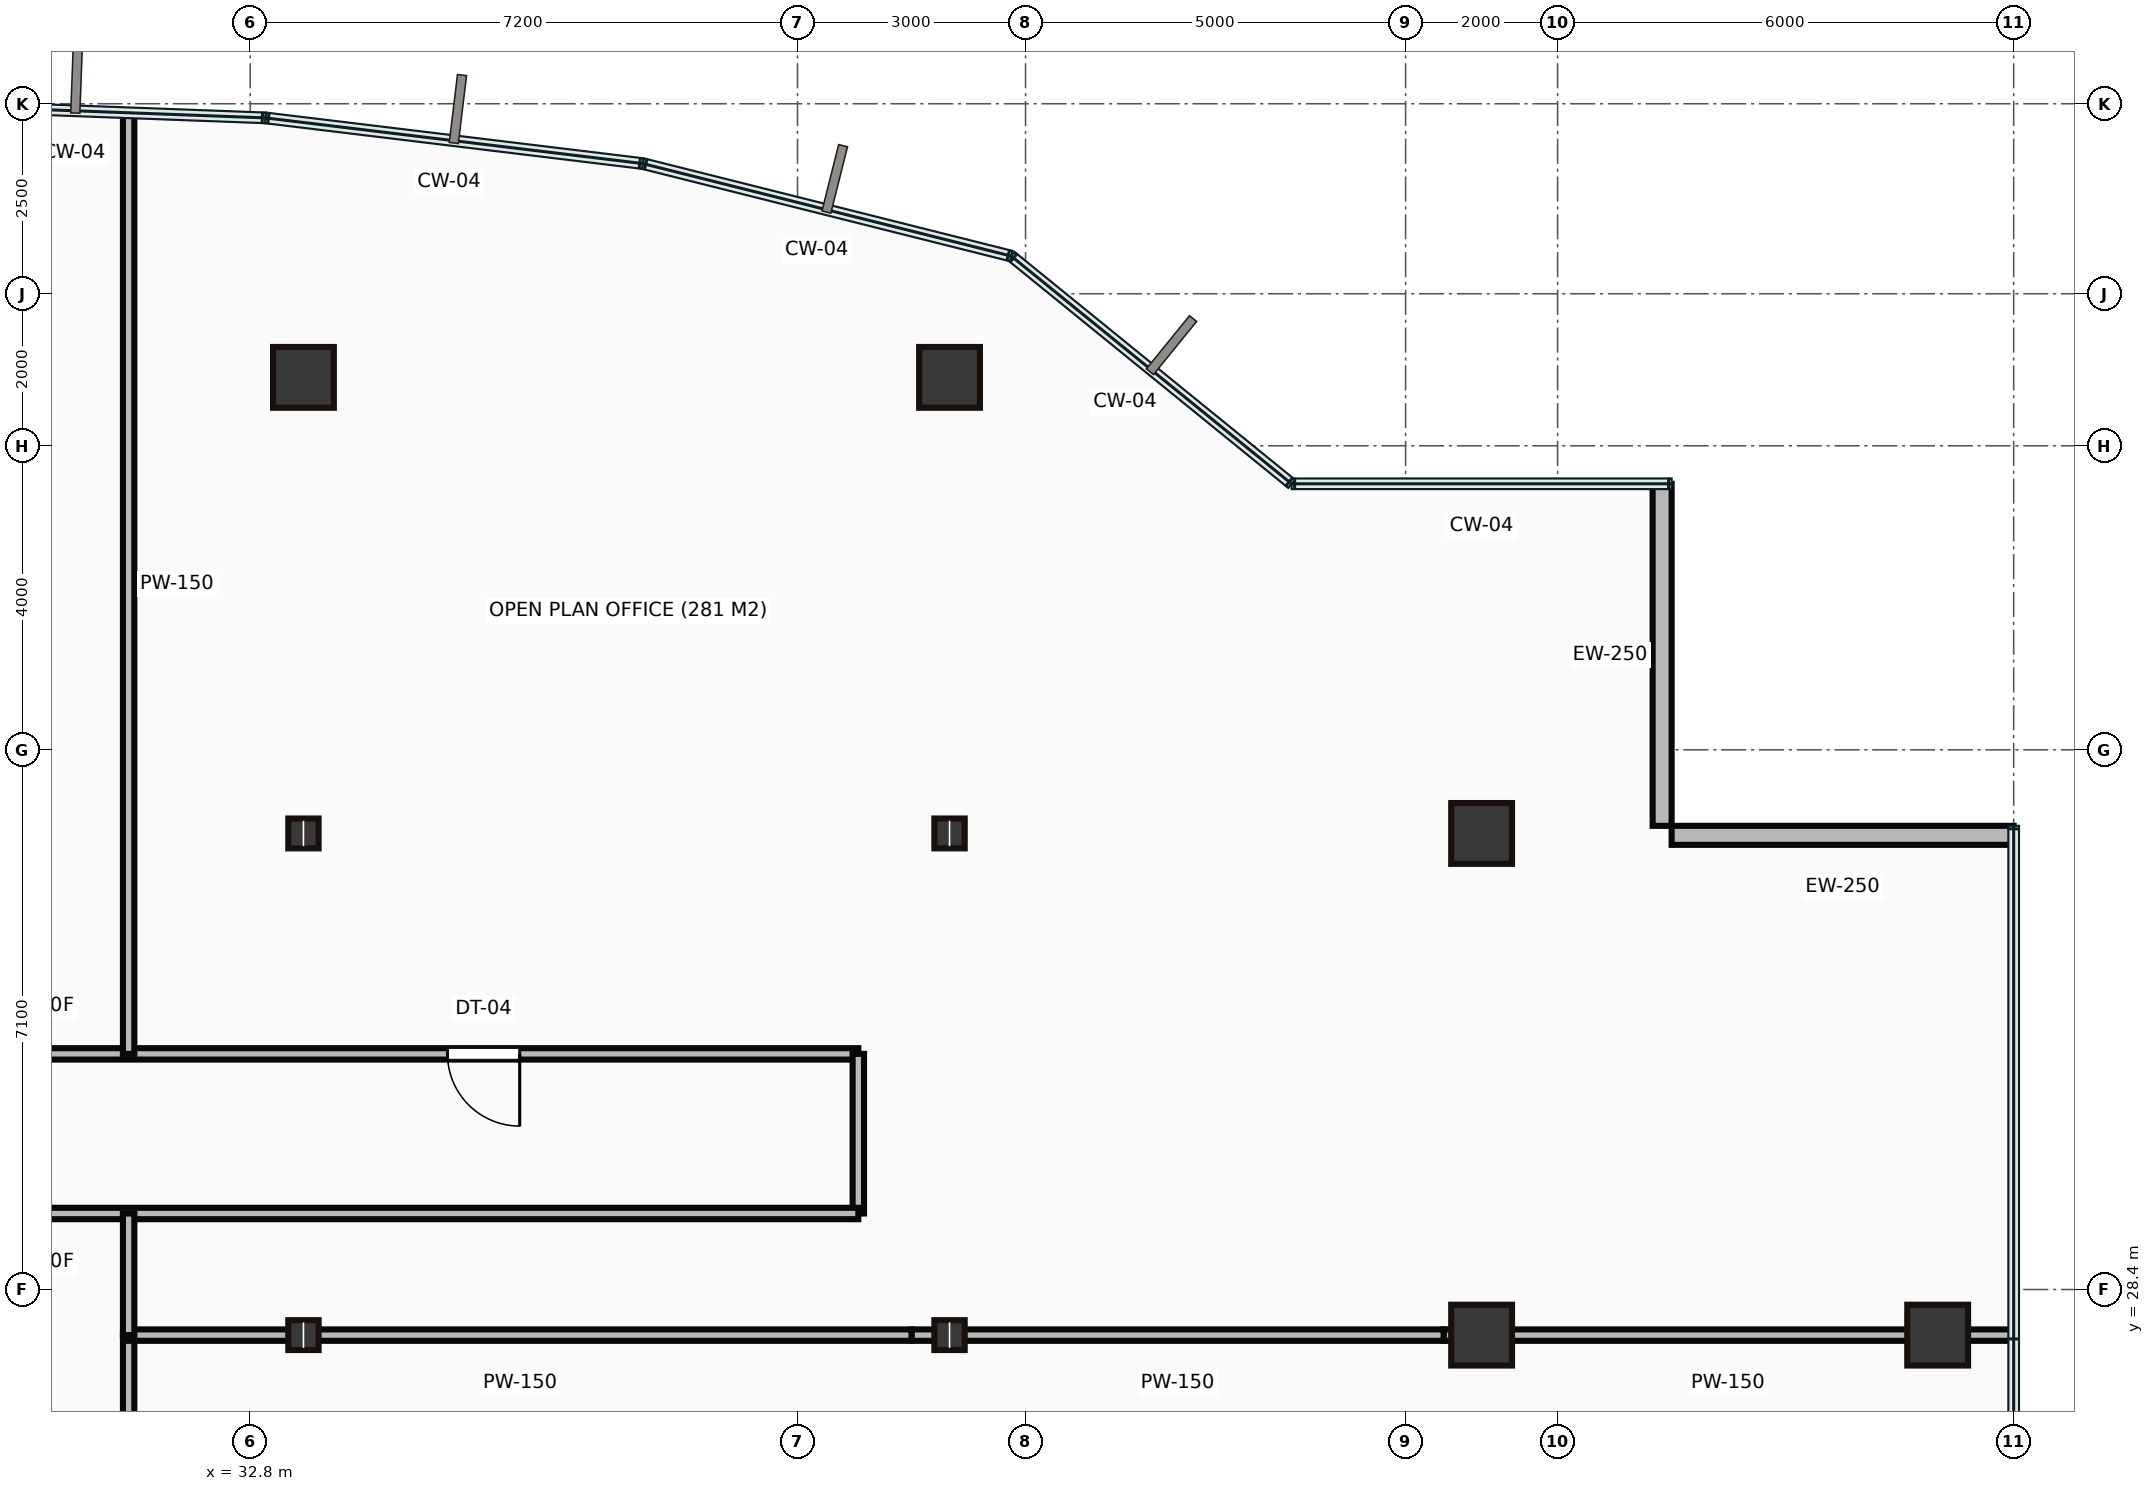
"""IFC4 building model, lengths in metres.
Left out: names, types, materials, properties, quantities, classifications, styles, units other than length and angle.
Written with IfcOpenShell. Run it as: python <this file> out.ifc"""

import sys

from ifc_helpers import new_model, si_unit, direction, frame, frame_2d, origin, origin_2d, place, context, subcontext, project, spatial, rectangle, hollow_rectangle, i_section, extrude, source, transform, mapped, element, fill, save


model = new_model("IFC4")
c1 = context("Model", 3, precision=1e-05, world=origin(), true_north=direction((0.0, 1.0)))
c2 = subcontext(c1, "Body", "Model", "MODEL_VIEW")
j1 = project(units=[si_unit("LENGTHUNIT", "METRE"), si_unit("PLANEANGLEUNIT", "RADIAN")], contexts=[c1])
p1 = place(None, origin())
s1 = spatial("IfcSite", under=j1, at=p1, CompositionType="ELEMENT")
p2 = place(p1, origin())
s2 = spatial("IfcBuilding", under=s1, at=p2, CompositionType="ELEMENT")
p3 = place(p2, frame((0.0, 0.0, 92.3)))
s3 = spatial("IfcBuildingStorey", under=s2, at=p3, CompositionType="ELEMENT", Elevation=92.3)
m1 = source(origin(), c2, "Body", "SweptSolid", [
    extrude(i_section(OverallWidth=0.399, OverallDepth=0.393, WebThickness=0.023, FlangeThickness=0.037, at=origin_2d()), origin(), (0.0, 0.0, 1.0), 3.65),
])
for number, where, z_axis, x_axis in (
    (1, (33.5, 27.8, 0.0), (0.0, 0.0, 1.0), (1.0, 0.0, 0.0)),
    (2, (33.5, 34.4, 0.0), (0.0, 0.0, 1.0), (1.0, 0.0, 0.0)),
):
    element("IfcColumn", number, at=place(p3, frame(where, z_axis=z_axis, x_axis=x_axis)), inside=s3, PredefinedType="COLUMN", context=c2, shape_type="MappedRepresentation", body=[
        mapped(m1, transform((0.0, 0.0, 0.0))),
    ])
m2 = source(origin(), c2, "Body", "SweptSolid", [
    extrude(hollow_rectangle(XDim=0.8, YDim=0.8, WallThickness=0.04, at=origin_2d()), origin(), (0.0, 0.0, 1.0), 3.65),
])
p4 = place(p3, frame((33.5, 40.4, 0.0), z_axis=(0.0, 0.0, 1.0), x_axis=(1.0, 0.0, 0.0)))
e3 = element("IfcColumn", 3, at=p4, inside=s3, PredefinedType="COLUMN", context=c2, shape_type="MappedRepresentation", body=[
    mapped(m2, transform((0.0, 0.0, 0.0))),
])
for number, where, z_axis, x_axis in (
    (4, (42.0, 27.8, 0.0), (0.0, 0.0, 1.0), (1.0, 0.0, 0.0)),
    (5, (42.0, 34.4, 0.0), (0.0, 0.0, 1.0), (1.0, 0.0, 0.0)),
):
    element("IfcColumn", number, at=place(p3, frame(where, z_axis=z_axis, x_axis=x_axis)), inside=s3, PredefinedType="COLUMN", context=c2, shape_type="MappedRepresentation", body=[
        mapped(m1, transform((0.0, 0.0, 0.0))),
    ])
for number, where, z_axis, x_axis in (
    (6, (42.0, 40.4, 0.0), (0.0, 0.0, 1.0), (1.0, 0.0, 0.0)),
    (7, (49.0, 27.8, 0.0), (0.0, 0.0, 1.0), (1.0, 0.0, 0.0)),
    (8, (49.0, 34.4, 0.0), (0.0, 0.0, 1.0), (1.0, 0.0, 0.0)),
    (9, (55.0, 27.8, 0.0), (0.0, 0.0, 1.0), (1.0, 0.0, 0.0)),
):
    element("IfcColumn", number, at=place(p3, frame(where, z_axis=z_axis, x_axis=x_axis)), inside=s3, PredefinedType="COLUMN", context=c2, shape_type="MappedRepresentation", body=[
        mapped(m2, transform((0.0, 0.0, 0.0))),
    ])
m3 = source(origin(), c2, "Body", "SweptSolid", [
    extrude(rectangle(XDim=4.5, YDim=0.25, at=frame_2d((2.25, 0.0))), origin(), (0.0, 0.0, 1.0), 3.4),
])
for number, where, z_axis, x_axis in (
    (10, (56.0, 34.375, 0.0), (0.0, 0.0, 1.0), (-1.0, 0.0, 0.0)),
    (11, (51.375, 34.5, 0.0), (0.0, 0.0, 1.0), (0.0, 1.0, 0.0)),
):
    element("IfcWall", number, at=place(p3, frame(where, z_axis=z_axis, x_axis=x_axis)), inside=s3, PredefinedType="STANDARD", context=c2, shape_type="MappedRepresentation", body=[
        mapped(m3, transform((0.0, 0.0, 0.0))),
    ])
m4 = source(origin(), c2, "Body", "SweptSolid", [
    extrude(rectangle(XDim=21.75, YDim=0.15, at=frame_2d((10.875, 0.0))), origin(), (0.0, 0.0, 1.0), 3.4),
])
p5 = place(p3, frame((19.05, 31.5, 0.0), z_axis=(0.0, 0.0, 1.0), x_axis=(1.0, 0.0, 0.0)))
e12 = element("IfcWall", 12, at=p5, inside=s3, PredefinedType="PARTITIONING", context=c2, shape_type="MappedRepresentation", body=[
    mapped(m4, transform((0.0, 0.0, 0.0))),
])
p6 = place(p5, frame((1.03, 0.0, 0.0)))
e13 = element("IfcOpeningElement", 13, at=p6, cuts=e12, PredefinedType="OPENING", context=c2, shape_type="SweptSolid", body=[
    extrude(rectangle(XDim=0.95, YDim=2.15, at=frame_2d((0.475, 1.075))), frame((0.0, 0.085, 0.0), z_axis=(0.0, -1.0, 0.0), x_axis=(1.0, 0.0, 0.0)), (0.0, 0.0, 1.0), 0.17),
])
p7 = place(p5, frame((6.975, 0.0, 0.0)))
e14 = element("IfcOpeningElement", 14, at=p7, cuts=e12, PredefinedType="OPENING", context=c2, shape_type="SweptSolid", body=[
    extrude(rectangle(XDim=0.95, YDim=2.15, at=frame_2d((0.475, 1.075))), frame((0.0, 0.085, 0.0), z_axis=(0.0, -1.0, 0.0), x_axis=(1.0, 0.0, 0.0)), (0.0, 0.0, 1.0), 0.17),
])
p8 = place(p5, frame((16.345, 0.0, 0.0)))
e15 = element("IfcOpeningElement", 15, at=p8, cuts=e12, PredefinedType="OPENING", context=c2, shape_type="SweptSolid", body=[
    extrude(rectangle(XDim=0.95, YDim=2.15, at=frame_2d((0.475, 1.075))), frame((0.0, 0.085, 0.0), z_axis=(0.0, -1.0, 0.0), x_axis=(1.0, 0.0, 0.0)), (0.0, 0.0, 1.0), 0.17),
])
m5 = source(origin(), c2, "Body", "SweptSolid", [
    extrude(rectangle(XDim=2.1, YDim=0.15, at=frame_2d((1.05, 0.0))), origin(), (0.0, 0.0, 1.0), 3.4),
])
p9 = place(p3, frame((40.8, 31.5, 0.0), z_axis=(0.0, 0.0, 1.0), x_axis=(0.0, -1.0, 0.0)))
e16 = element("IfcWall", 16, at=p9, inside=s3, PredefinedType="PARTITIONING", context=c2, shape_type="MappedRepresentation", body=[
    mapped(m5, transform((0.0, 0.0, 0.0))),
])
p10 = place(p3, frame((40.8, 29.4, 0.0), z_axis=(0.0, 0.0, 1.0), x_axis=(-1.0, 0.0, 0.0)))
e17 = element("IfcWall", 17, at=p10, inside=s3, PredefinedType="PARTITIONING", context=c2, shape_type="MappedRepresentation", body=[
    mapped(m4, transform((0.0, 0.0, 0.0))),
])
m6 = source(origin(), c2, "Body", "SweptSolid", [
    extrude(rectangle(XDim=11.5, YDim=0.15, at=frame_2d((5.75, 0.0))), origin(), (0.0, 0.0, 1.0), 3.4),
])
p11 = place(p3, frame((31.2, 27.8, 0.0), z_axis=(0.0, 0.0, 1.0), x_axis=(0.0, -1.0, 0.0)))
e18 = element("IfcWall", 18, at=p11, inside=s3, PredefinedType="PARTITIONING", context=c2, shape_type="MappedRepresentation", body=[
    mapped(m6, transform((0.0, 0.0, 0.0))),
])
m7 = source(origin(), c2, "Body", "SweptSolid", [
    extrude(rectangle(XDim=7.48, YDim=0.15, at=frame_2d((3.74, 0.0))), origin(), (0.0, 0.0, 1.0), 2.702),
])
p12 = place(p3, frame((55.98, 27.8, 0.0), z_axis=(0.0, 0.0, 1.0), x_axis=(-1.0, 0.0, 0.0)))
e19 = element("IfcWall", 19, at=p12, inside=s3, PredefinedType="PARTITIONING", context=c2, shape_type="MappedRepresentation", body=[
    mapped(m7, transform((0.0, 0.0, 0.0))),
])
m8 = source(origin(), c2, "Body", "SweptSolid", [
    extrude(rectangle(XDim=7.0, YDim=0.15, at=frame_2d((3.5, 0.0))), origin(), (0.0, 0.0, 1.0), 2.702),
])
p13 = place(p3, frame((48.5, 27.8, 0.0), z_axis=(0.0, 0.0, 1.0), x_axis=(-1.0, 0.0, 0.0)))
e20 = element("IfcWall", 20, at=p13, inside=s3, PredefinedType="PARTITIONING", context=c2, shape_type="MappedRepresentation", body=[
    mapped(m8, transform((0.0, 0.0, 0.0))),
])
m9 = source(origin(), c2, "Body", "SweptSolid", [
    extrude(rectangle(XDim=10.3, YDim=0.15, at=frame_2d((5.15, 0.0))), origin(), (0.0, 0.0, 1.0), 2.702),
])
p14 = place(p3, frame((41.5, 27.8, 0.0), z_axis=(0.0, 0.0, 1.0), x_axis=(-1.0, 0.0, 0.0)))
e21 = element("IfcWall", 21, at=p14, inside=s3, PredefinedType="PARTITIONING", context=c2, shape_type="MappedRepresentation", body=[
    mapped(m9, transform((0.0, 0.0, 0.0))),
])
m10 = source(origin(), c2, "Body", "SweptSolid", [
    extrude(rectangle(XDim=1.6, YDim=0.15, at=frame_2d((0.8, 0.0))), origin(), (0.0, 0.0, 1.0), 3.4),
])
p15 = place(p3, frame((31.2, 29.4, 0.0), z_axis=(0.0, 0.0, 1.0), x_axis=(0.0, -1.0, 0.0)))
e22 = element("IfcWall", 22, at=p15, inside=s3, PredefinedType="PARTITIONING", context=c2, shape_type="MappedRepresentation", body=[
    mapped(m10, transform((0.0, 0.0, 0.0))),
])
m11 = source(origin(), c2, "Body", "SweptSolid", [
    extrude(rectangle(XDim=12.361, YDim=0.15, at=frame_2d((6.18, 0.0))), origin(), (0.0, 0.0, 1.0), 3.4),
])
p16 = place(p3, frame((31.2, 43.861, 0.0), z_axis=(0.0, 0.0, 1.0), x_axis=(0.0, -1.0, 0.0)))
e23 = element("IfcWall", 23, at=p16, inside=s3, PredefinedType="PARTITIONING", context=c2, shape_type="MappedRepresentation", body=[
    mapped(m11, transform((0.0, 0.0, 0.0))),
])
m12 = source(origin(), c2, "Body", "SweptSolid", [
    extrude(rectangle(XDim=0.95, YDim=2.15, at=frame_2d((0.475, 1.075))), frame((0.0, 0.025, 0.0), z_axis=(0.0, -1.0, 0.0), x_axis=(1.0, 0.0, 0.0)), (0.0, 0.0, 1.0), 0.05),
])
p17 = place(p8, origin())
e24 = element("IfcDoor", 24, at=p17, inside=s3, OperationType="SINGLE_SWING_RIGHT", PredefinedType="DOOR", context=c2, shape_type="MappedRepresentation", body=[
    mapped(m12, transform((0.0, 0.0, 0.0))),
])
fill(e15, e24)
save(model, sys.argv[1])
